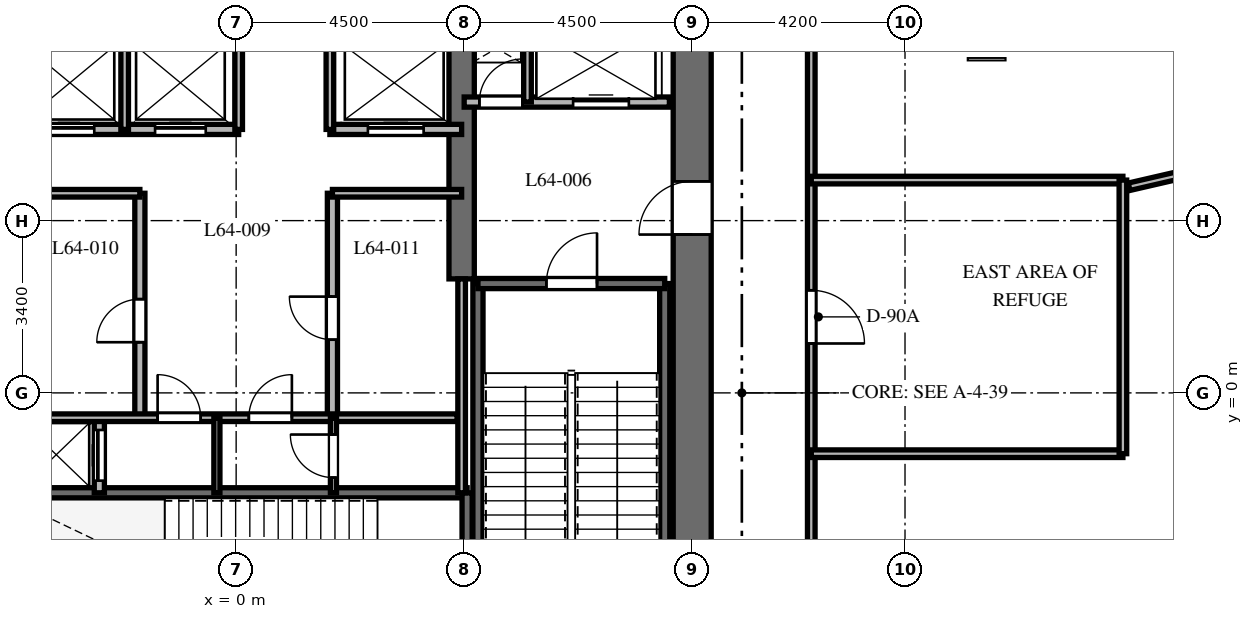
"""IFC4 building model, lengths in metres.
Left out: names, types, materials, properties, quantities, classifications, styles, units other than length and angle.
Written with IfcOpenShell. Run it as: python <this file> out.ifc"""

import sys

from ifc_helpers import new_model, si_unit, direction, frame, frame_2d, origin, place, context, subcontext, project, spatial, rectangle, extrude, element, fill, save


model = new_model("IFC4")
c1 = context("Model", 3, precision=1e-05, world=origin(), true_north=direction((0.0, 1.0)))
c2 = subcontext(c1, "Body", "Model", "MODEL_VIEW")
j1 = project(units=[si_unit("LENGTHUNIT", "METRE"), si_unit("PLANEANGLEUNIT", "RADIAN")], contexts=[c1])
p1 = place(None, origin())
s1 = spatial("IfcSite", under=j1, at=p1, CompositionType="ELEMENT")
p2 = place(p1, origin())
s2 = spatial("IfcBuilding", under=s1, at=p2, CompositionType="ELEMENT")
p3 = place(p2, frame((0.0, 0.0, 255.9)))
s3 = spatial("IfcBuildingStorey", under=s2, at=p3, CompositionType="ELEMENT", Elevation=255.9)
p4 = place(p3, frame((9.0, -7.125, 0.0), z_axis=(0.0, 0.0, 1.0), x_axis=(0.0, 1.0, 0.0)))
e1 = element("IfcWall", 1, at=p4, inside=s3, PredefinedType="SHEAR", context=c2, shape_type="SweptSolid", body=[
    extrude(rectangle(XDim=14.25, YDim=0.75, at=frame_2d((7.125, 0.0))), origin(), (0.0, 0.0, 1.0), 5.4),
])
p5 = place(p4, frame((10.25, 0.0, 0.0)))
e2 = element("IfcOpeningElement", 2, at=p5, cuts=e1, PredefinedType="OPENING", context=c2, shape_type="SweptSolid", body=[
    extrude(rectangle(XDim=1.05, YDim=2.15, at=frame_2d((0.525, 1.075))), frame((0.0, 0.385, 0.0), z_axis=(0.0, -1.0, 0.0), x_axis=(1.0, 0.0, 0.0)), (0.0, 0.0, 1.0), 0.77),
])
p6 = place(p3, frame((4.45, 2.25, 0.0), z_axis=(0.0, 0.0, 1.0), x_axis=(0.0, 1.0, 0.0)))
e3 = element("IfcWall", 3, at=p6, inside=s3, PredefinedType="SHEAR", context=c2, shape_type="SweptSolid", body=[
    extrude(rectangle(XDim=4.875, YDim=0.5, at=frame_2d((2.438, 0.0))), origin(), (0.0, 0.0, 1.0), 5.4),
])
for number, where, z_axis, x_axis in (
    (4, (4.772, -6.985, 0.0), (0.0, 0.0, 1.0), (0.0, 1.0, 0.0)),
    (5, (8.458, -6.985, 0.0), (0.0, 0.0, 1.0), (0.0, 1.0, 0.0)),
):
    element("IfcWall", number, at=place(p3, frame(where, z_axis=z_axis, x_axis=x_axis)), inside=s3, PredefinedType="SHEAR", context=c2, shape_type="SweptSolid", body=[
        extrude(rectangle(XDim=9.143, YDim=0.2, at=frame_2d((4.572, 0.0))), origin(), (0.0, 0.0, 1.0), 5.4),
    ])
p7 = place(p3, frame((4.772, 2.158, 0.0), z_axis=(0.0, 0.0, 1.0), x_axis=(1.0, 0.0, 0.0)))
e6 = element("IfcWall", 6, at=p7, inside=s3, PredefinedType="SHEAR", context=c2, shape_type="SweptSolid", body=[
    extrude(rectangle(XDim=3.686, YDim=0.2, at=frame_2d((1.843, 0.0))), origin(), (0.0, 0.0, 1.0), 5.4),
])
p8 = place(p7, frame((1.35, 0.0, 0.0)))
e7 = element("IfcOpeningElement", 7, at=p8, cuts=e6, PredefinedType="OPENING", context=c2, shape_type="SweptSolid", body=[
    extrude(rectangle(XDim=1.0, YDim=2.15, at=frame_2d((0.5, 1.075))), frame((0.0, 0.11, 0.0), z_axis=(0.0, -1.0, 0.0), x_axis=(1.0, 0.0, 0.0)), (0.0, 0.0, 1.0), 0.22),
])
p9 = place(p3, frame((-4.608, -1.972, 0.0), z_axis=(0.0, 0.0, 1.0), x_axis=(1.0, 0.0, 0.0)))
e8 = element("IfcWall", 8, at=p9, inside=s3, PredefinedType="SHEAR", context=c2, shape_type="SweptSolid", body=[
    extrude(rectangle(XDim=9.166, YDim=0.2, at=frame_2d((4.583, 0.0))), origin(), (0.0, 0.0, 1.0), 5.4),
])
p10 = place(p3, frame((4.558, -5.658, 0.0), z_axis=(0.0, 0.0, 1.0), x_axis=(0.0, 1.0, 0.0)))
e9 = element("IfcWall", 9, at=p10, inside=s3, PredefinedType="SHEAR", context=c2, shape_type="SweptSolid", body=[
    extrude(rectangle(XDim=3.686, YDim=0.2, at=frame_2d((1.843, 0.0))), origin(), (0.0, 0.0, 1.0), 5.4),
])
p11 = place(p3, frame((16.324, -19.275, 0.0), z_axis=(0.0, 0.0, 1.0), x_axis=(0.325083142304, 0.945685439557, 0.0)))
e10 = element("IfcWall", 10, at=p11, inside=s3, PredefinedType="SOLIDWALL", context=c2, shape_type="SweptSolid", body=[
    extrude(rectangle(XDim=20.224, YDim=0.45, at=frame_2d((10.112, 0.0))), origin(), (0.0, 0.0, 1.0), 5.1),
])
p12 = place(p3, frame((22.74, 2.452, 0.0), z_axis=(0.0, 0.0, 1.0), x_axis=(-0.437753424814, 0.899095066755, 0.0)))
e11 = element("IfcWall", 11, at=p12, inside=s3, PredefinedType="SOLIDWALL", context=c2, shape_type="SweptSolid", body=[
    extrude(rectangle(XDim=19.137, YDim=0.45, at=frame_2d((9.569, 0.0))), origin(), (0.0, 0.0, 1.0), 5.1),
])
p13 = place(p3, frame((4.5, 5.74, 0.0), z_axis=(0.0, 0.0, 1.0), x_axis=(1.0, 0.0, 0.0)))
e12 = element("IfcWall", 12, at=p13, inside=s3, PredefinedType="PARTITIONING", context=c2, shape_type="SweptSolid", body=[
    extrude(rectangle(XDim=4.05, YDim=0.2, at=frame_2d((2.025, 0.0))), origin(), (0.0, 0.0, 1.0), 5.1),
])
p14 = place(p13, frame((0.3, 0.0, 0.0)))
e13 = element("IfcOpeningElement", 13, at=p14, cuts=e12, PredefinedType="OPENING", context=c2, shape_type="SweptSolid", body=[
    extrude(rectangle(XDim=0.85, YDim=2.03, at=frame_2d((0.425, 1.015))), frame((0.0, 0.11, 0.0), z_axis=(0.0, -1.0, 0.0), x_axis=(1.0, 0.0, 0.0)), (0.0, 0.0, 1.0), 0.22),
])
p15 = place(p13, frame((2.15, 0.0, 0.0)))
e14 = element("IfcOpeningElement", 14, at=p15, cuts=e12, PredefinedType="OPENING", context=c2, shape_type="SweptSolid", body=[
    extrude(rectangle(XDim=1.1, YDim=2.2, at=frame_2d((0.55, 1.1))), frame((0.0, 0.11, 0.0), z_axis=(0.0, -1.0, 0.0), x_axis=(1.0, 0.0, 0.0)), (0.0, 0.0, 1.0), 0.22),
])
p16 = place(p3, frame((5.75, 5.74, 0.0), z_axis=(0.0, 0.0, 1.0), x_axis=(0.0, 1.0, 0.0)))
e15 = element("IfcWall", 15, at=p16, inside=s3, PredefinedType="PARTITIONING", context=c2, shape_type="SweptSolid", body=[
    extrude(rectangle(XDim=1.41, YDim=0.15, at=frame_2d((0.705, 0.0))), origin(), (0.0, 0.0, 1.0), 5.1),
])
p17 = place(p3, frame((-2.7, -1.972, 0.0), z_axis=(0.0, 0.0, 1.0), x_axis=(0.0, 1.0, 0.0)))
e16 = element("IfcWall", 16, at=p17, inside=s3, PredefinedType="PARTITIONING", context=c2, shape_type="SweptSolid", body=[
    extrude(rectangle(XDim=1.472, YDim=0.2, at=frame_2d((0.736, 0.0))), origin(), (0.0, 0.0, 1.0), 5.1),
])
p18 = place(p17, frame((0.24, 0.0, 0.0)))
e17 = element("IfcOpeningElement", 17, at=p18, cuts=e16, PredefinedType="OPENING", context=c2, shape_type="SweptSolid", body=[
    extrude(rectangle(XDim=1.0, YDim=2.2, at=frame_2d((0.5, 1.1))), frame((0.0, 0.11, 0.0), z_axis=(0.0, -1.0, 0.0), x_axis=(1.0, 0.0, 0.0)), (0.0, 0.0, 1.0), 0.22),
])
p19 = place(p3, frame((-4.45, 5.2, 0.0), z_axis=(0.0, 0.0, 1.0), x_axis=(1.0, 0.0, 0.0)))
e18 = element("IfcWall", 18, at=p19, inside=s3, PredefinedType="PARTITIONING", context=c2, shape_type="SweptSolid", body=[
    extrude(rectangle(XDim=4.5, YDim=0.2, at=frame_2d((2.25, 0.0))), origin(), (0.0, 0.0, 1.0), 5.1),
])
p20 = place(p19, frame((0.65, 0.0, 0.0)))
e19 = element("IfcOpeningElement", 19, at=p20, cuts=e18, PredefinedType="OPENING", context=c2, shape_type="SweptSolid", body=[
    extrude(rectangle(XDim=1.0, YDim=2.2, at=frame_2d((0.5, 1.1))), frame((0.0, 0.11, 0.0), z_axis=(0.0, -1.0, 0.0), x_axis=(1.0, 0.0, 0.0)), (0.0, 0.0, 1.0), 0.22),
])
p21 = place(p19, frame((2.85, 0.0, 0.0)))
e20 = element("IfcOpeningElement", 20, at=p21, cuts=e18, PredefinedType="OPENING", context=c2, shape_type="SweptSolid", body=[
    extrude(rectangle(XDim=1.0, YDim=2.2, at=frame_2d((0.5, 1.1))), frame((0.0, 0.11, 0.0), z_axis=(0.0, -1.0, 0.0), x_axis=(1.0, 0.0, 0.0)), (0.0, 0.0, 1.0), 0.22),
])
p22 = place(p3, frame((1.85, 5.2, 0.0), z_axis=(0.0, 0.0, 1.0), x_axis=(1.0, 0.0, 0.0)))
e21 = element("IfcWall", 21, at=p22, inside=s3, PredefinedType="PARTITIONING", context=c2, shape_type="SweptSolid", body=[
    extrude(rectangle(XDim=2.6, YDim=0.2, at=frame_2d((1.3, 0.0))), origin(), (0.0, 0.0, 1.0), 5.1),
])
p23 = place(p22, frame((0.75, 0.0, 0.0)))
e22 = element("IfcOpeningElement", 22, at=p23, cuts=e21, PredefinedType="OPENING", context=c2, shape_type="SweptSolid", body=[
    extrude(rectangle(XDim=1.1, YDim=2.2, at=frame_2d((0.55, 1.1))), frame((0.0, 0.11, 0.0), z_axis=(0.0, -1.0, 0.0), x_axis=(1.0, 0.0, 0.0)), (0.0, 0.0, 1.0), 0.22),
])
p24 = place(p3, frame((-2.2, 5.2, 0.0), z_axis=(0.0, 0.0, 1.0), x_axis=(0.0, 1.0, 0.0)))
e23 = element("IfcWall", 23, at=p24, inside=s3, PredefinedType="PARTITIONING", context=c2, shape_type="SweptSolid", body=[
    extrude(rectangle(XDim=1.85, YDim=0.15, at=frame_2d((0.925, 0.0))), origin(), (0.0, 0.0, 1.0), 5.1),
])
for number, where, z_axis, x_axis in (
    (24, (0.05, 5.2, 0.0), (0.0, 0.0, 1.0), (0.0, 1.0, 0.0)),
    (25, (1.85, 5.2, 0.0), (0.0, 0.0, 1.0), (0.0, 1.0, 0.0)),
):
    element("IfcWall", number, at=place(p3, frame(where, z_axis=z_axis, x_axis=x_axis)), inside=s3, PredefinedType="PARTITIONING", context=c2, shape_type="SweptSolid", body=[
        extrude(rectangle(XDim=1.95, YDim=0.15, at=frame_2d((0.975, 0.0))), origin(), (0.0, 0.0, 1.0), 5.1),
    ])
p25 = place(p3, frame((4.45, -1.972, 0.0), z_axis=(0.0, 0.0, 1.0), x_axis=(0.0, 1.0, 0.0)))
e26 = element("IfcWall", 26, at=p25, inside=s3, PredefinedType="PARTITIONING", context=c2, shape_type="SweptSolid", body=[
    extrude(rectangle(XDim=4.222, YDim=0.15, at=frame_2d((2.111, 0.0))), origin(), (0.0, 0.0, 1.0), 5.1),
])
p26 = place(p3, frame((-1.9, -0.5, 0.0), z_axis=(0.0, 0.0, 1.0), x_axis=(0.0, 1.0, 0.0)))
e27 = element("IfcWall", 27, at=p26, inside=s3, PredefinedType="PARTITIONING", context=c2, shape_type="SweptSolid", body=[
    extrude(rectangle(XDim=4.44, YDim=0.2, at=frame_2d((2.22, 0.0))), origin(), (0.0, 0.0, 1.0), 5.1),
])
p27 = place(p26, frame((1.5, 0.0, 0.0)))
e28 = element("IfcOpeningElement", 28, at=p27, cuts=e27, PredefinedType="OPENING", context=c2, shape_type="SweptSolid", body=[
    extrude(rectangle(XDim=0.85, YDim=2.03, at=frame_2d((0.425, 1.015))), frame((0.0, 0.11, 0.0), z_axis=(0.0, -1.0, 0.0), x_axis=(1.0, 0.0, 0.0)), (0.0, 0.0, 1.0), 0.22),
])
p28 = place(p3, frame((-4.45, 3.94, 0.0), z_axis=(0.0, 0.0, 1.0), x_axis=(1.0, 0.0, 0.0)))
e29 = element("IfcWall", 29, at=p28, inside=s3, PredefinedType="PARTITIONING", context=c2, shape_type="SweptSolid", body=[
    extrude(rectangle(XDim=2.55, YDim=0.15, at=frame_2d((1.275, 0.0))), origin(), (0.0, 0.0, 1.0), 5.1),
])
p29 = place(p3, frame((1.9, -0.5, 0.0), z_axis=(0.0, 0.0, 1.0), x_axis=(0.0, 1.0, 0.0)))
e30 = element("IfcWall", 30, at=p29, inside=s3, PredefinedType="PARTITIONING", context=c2, shape_type="SweptSolid", body=[
    extrude(rectangle(XDim=4.44, YDim=0.2, at=frame_2d((2.22, 0.0))), origin(), (0.0, 0.0, 1.0), 5.1),
])
p30 = place(p29, frame((1.55, 0.0, 0.0)))
e31 = element("IfcOpeningElement", 31, at=p30, cuts=e30, PredefinedType="OPENING", context=c2, shape_type="SweptSolid", body=[
    extrude(rectangle(XDim=0.85, YDim=2.03, at=frame_2d((0.425, 1.015))), frame((0.0, 0.11, 0.0), z_axis=(0.0, -1.0, 0.0), x_axis=(1.0, 0.0, 0.0)), (0.0, 0.0, 1.0), 0.22),
])
p31 = place(p3, frame((1.9, 3.94, 0.0), z_axis=(0.0, 0.0, 1.0), x_axis=(1.0, 0.0, 0.0)))
e32 = element("IfcWall", 32, at=p31, inside=s3, PredefinedType="PARTITIONING", context=c2, shape_type="SweptSolid", body=[
    extrude(rectangle(XDim=2.55, YDim=0.15, at=frame_2d((1.275, 0.0))), origin(), (0.0, 0.0, 1.0), 5.1),
])
p32 = place(p3, frame((-4.36, -0.49, 0.0), z_axis=(0.0, 0.0, 1.0), x_axis=(1.0, 0.0, 0.0)))
e33 = element("IfcWall", 33, at=p32, inside=s3, PredefinedType="PARTITIONING", context=c2, shape_type="SweptSolid", body=[
    extrude(rectangle(XDim=8.72, YDim=0.15, at=frame_2d((4.36, 0.0))), origin(), (0.0, 0.0, 1.0), 5.1),
])
p33 = place(p32, frame((2.81, 0.0, 0.0)))
e34 = element("IfcOpeningElement", 34, at=p33, cuts=e33, PredefinedType="OPENING", context=c2, shape_type="SweptSolid", body=[
    extrude(rectangle(XDim=0.85, YDim=2.03, at=frame_2d((0.425, 1.015))), frame((0.0, 0.085, 0.0), z_axis=(0.0, -1.0, 0.0), x_axis=(1.0, 0.0, 0.0)), (0.0, 0.0, 1.0), 0.17),
])
p34 = place(p32, frame((4.61, 0.0, 0.0)))
e35 = element("IfcOpeningElement", 35, at=p34, cuts=e33, PredefinedType="OPENING", context=c2, shape_type="SweptSolid", body=[
    extrude(rectangle(XDim=0.85, YDim=2.03, at=frame_2d((0.425, 1.015))), frame((0.0, 0.085, 0.0), z_axis=(0.0, -1.0, 0.0), x_axis=(1.0, 0.0, 0.0)), (0.0, 0.0, 1.0), 0.17),
])
p35 = place(p3, frame((-0.38, -1.972, 0.0), z_axis=(0.0, 0.0, 1.0), x_axis=(0.0, 1.0, 0.0)))
e36 = element("IfcWall", 36, at=p35, inside=s3, PredefinedType="PARTITIONING", context=c2, shape_type="SweptSolid", body=[
    extrude(rectangle(XDim=1.472, YDim=0.12, at=frame_2d((0.736, 0.0))), origin(), (0.0, 0.0, 1.0), 5.1),
])
p36 = place(p3, frame((1.92, -1.972, 0.0), z_axis=(0.0, 0.0, 1.0), x_axis=(0.0, 1.0, 0.0)))
e37 = element("IfcWall", 37, at=p36, inside=s3, PredefinedType="PARTITIONING", context=c2, shape_type="SweptSolid", body=[
    extrude(rectangle(XDim=1.472, YDim=0.12, at=frame_2d((0.736, 0.0))), origin(), (0.0, 0.0, 1.0), 5.1),
])
p37 = place(p36, frame((0.3, 0.0, 0.0)))
e38 = element("IfcOpeningElement", 38, at=p37, cuts=e37, PredefinedType="OPENING", context=c2, shape_type="SweptSolid", body=[
    extrude(rectangle(XDim=0.85, YDim=2.03, at=frame_2d((0.425, 1.015))), frame((0.0, 0.07, 0.0), z_axis=(0.0, -1.0, 0.0), x_axis=(1.0, 0.0, 0.0)), (0.0, 0.0, 1.0), 0.14),
])
p38 = place(p3, frame((11.35, 9.85, 0.0), z_axis=(0.0, 0.0, 1.0), x_axis=(0.0, -1.0, 0.0)))
e39 = element("IfcWall", 39, at=p38, inside=s3, PredefinedType="PARTITIONING", context=c2, shape_type="SweptSolid", body=[
    extrude(rectangle(XDim=19.7, YDim=0.15, at=frame_2d((9.85, 0.0))), origin(), (0.0, 0.0, 1.0), 3.29),
])
p39 = place(p38, frame((7.825, 0.0, 0.0)))
e40 = element("IfcOpeningElement", 40, at=p39, cuts=e39, PredefinedType="OPENING", context=c2, shape_type="SweptSolid", body=[
    extrude(rectangle(XDim=1.05, YDim=2.15, at=frame_2d((0.525, 1.075))), frame((0.0, 0.085, 0.0), z_axis=(0.0, -1.0, 0.0), x_axis=(1.0, 0.0, 0.0)), (0.0, 0.0, 1.0), 0.17),
])
p40 = place(p38, frame((14.755, 0.0, 0.0)))
e41 = element("IfcOpeningElement", 41, at=p40, cuts=e39, PredefinedType="OPENING", context=c2, shape_type="SweptSolid", body=[
    extrude(rectangle(XDim=1.0, YDim=2.15, at=frame_2d((0.5, 1.075))), frame((0.0, 0.085, 0.0), z_axis=(0.0, -1.0, 0.0), x_axis=(1.0, 0.0, 0.0)), (0.0, 0.0, 1.0), 0.17),
])
for number, where, z_axis, x_axis in (
    (42, (11.35, -1.2, 0.0), (0.0, 0.0, 1.0), (1.0, 0.0, 0.0)),
    (43, (11.35, 4.2, 0.0), (0.0, 0.0, 1.0), (1.0, 0.0, 0.0)),
):
    element("IfcWall", number, at=place(p3, frame(where, z_axis=z_axis, x_axis=x_axis)), inside=s3, PredefinedType="PARTITIONING", context=c2, shape_type="SweptSolid", body=[
        extrude(rectangle(XDim=6.15, YDim=0.15, at=frame_2d((3.075, 0.0))), origin(), (0.0, 0.0, 1.0), 4.541),
    ])
p41 = place(p3, frame((17.5, -1.2, 0.0), z_axis=(0.0, 0.0, 1.0), x_axis=(0.0, 1.0, 0.0)))
e44 = element("IfcWall", 44, at=p41, inside=s3, PredefinedType="PARTITIONING", context=c2, shape_type="SweptSolid", body=[
    extrude(rectangle(XDim=5.4, YDim=0.15, at=frame_2d((2.7, 0.0))), origin(), (0.0, 0.0, 1.0), 5.1),
])
p42 = place(p3, frame((17.623, 4.069, 0.0), z_axis=(0.0, 0.0, 1.0), x_axis=(0.974369561662, 0.224953233598, 0.0)))
e45 = element("IfcWall", 45, at=p42, inside=s3, PredefinedType="PARTITIONING", context=c2, shape_type="SweptSolid", body=[
    extrude(rectangle(XDim=3.995, YDim=0.15, at=frame_2d((1.998, 0.0))), origin(), (0.0, 0.0, 1.0), 3.29),
])
p43 = place(p8, origin())
e46 = element("IfcDoor", 46, at=p43, inside=s3, OperationType="SINGLE_SWING_RIGHT", PredefinedType="DOOR", context=c2, shape_type="SweptSolid", body=[
    extrude(rectangle(XDim=1.0, YDim=2.15, at=frame_2d((0.5, 1.075))), frame((0.0, 0.025, 0.0), z_axis=(0.0, -1.0, 0.0), x_axis=(1.0, 0.0, 0.0)), (0.0, 0.0, 1.0), 0.05),
])
fill(e7, e46)
p44 = place(p5, origin())
e47 = element("IfcDoor", 47, at=p44, inside=s3, OperationType="SINGLE_SWING_LEFT", PredefinedType="DOOR", context=c2, shape_type="SweptSolid", body=[
    extrude(rectangle(XDim=1.05, YDim=2.15, at=frame_2d((0.525, 1.075))), frame((0.0, 0.025, 0.0), z_axis=(0.0, -1.0, 0.0), x_axis=(1.0, 0.0, 0.0)), (0.0, 0.0, 1.0), 0.05),
])
fill(e2, e47)
p45 = place(p14, origin())
e48 = element("IfcDoor", 48, at=p45, inside=s3, OperationType="SINGLE_SWING_RIGHT", PredefinedType="DOOR", context=c2, shape_type="SweptSolid", body=[
    extrude(rectangle(XDim=0.85, YDim=2.03, at=frame_2d((0.425, 1.015))), frame((0.0, 0.025, 0.0), z_axis=(0.0, -1.0, 0.0), x_axis=(1.0, 0.0, 0.0)), (0.0, 0.0, 1.0), 0.05),
])
fill(e13, e48)
p46 = place(p15, origin())
e49 = element("IfcDoor", 49, at=p46, inside=s3, OperationType="SLIDING_TO_RIGHT", PredefinedType="DOOR", context=c2, shape_type="SweptSolid", body=[
    extrude(rectangle(XDim=1.1, YDim=2.2, at=frame_2d((0.55, 1.1))), frame((0.0, 0.025, 0.0), z_axis=(0.0, -1.0, 0.0), x_axis=(1.0, 0.0, 0.0)), (0.0, 0.0, 1.0), 0.05),
])
fill(e14, e49)
p47 = place(p18, origin())
e50 = element("IfcDoor", 50, at=p47, inside=s3, OperationType="SLIDING_TO_LEFT", PredefinedType="DOOR", context=c2, shape_type="SweptSolid", body=[
    extrude(rectangle(XDim=1.0, YDim=2.2, at=frame_2d((0.5, 1.1))), frame((0.0, 0.025, 0.0), z_axis=(0.0, -1.0, 0.0), x_axis=(1.0, 0.0, 0.0)), (0.0, 0.0, 1.0), 0.05),
])
fill(e17, e50)
p48 = place(p20, origin())
e51 = element("IfcDoor", 51, at=p48, inside=s3, OperationType="SLIDING_TO_LEFT", PredefinedType="DOOR", context=c2, shape_type="SweptSolid", body=[
    extrude(rectangle(XDim=1.0, YDim=2.2, at=frame_2d((0.5, 1.1))), frame((0.0, 0.025, 0.0), z_axis=(0.0, -1.0, 0.0), x_axis=(1.0, 0.0, 0.0)), (0.0, 0.0, 1.0), 0.05),
])
fill(e19, e51)
p49 = place(p21, origin())
e52 = element("IfcDoor", 52, at=p49, inside=s3, OperationType="SLIDING_TO_RIGHT", PredefinedType="DOOR", context=c2, shape_type="SweptSolid", body=[
    extrude(rectangle(XDim=1.0, YDim=2.2, at=frame_2d((0.5, 1.1))), frame((0.0, 0.025, 0.0), z_axis=(0.0, -1.0, 0.0), x_axis=(1.0, 0.0, 0.0)), (0.0, 0.0, 1.0), 0.05),
])
fill(e20, e52)
p50 = place(p23, origin())
e53 = element("IfcDoor", 53, at=p50, inside=s3, OperationType="SLIDING_TO_RIGHT", PredefinedType="DOOR", context=c2, shape_type="SweptSolid", body=[
    extrude(rectangle(XDim=1.1, YDim=2.2, at=frame_2d((0.55, 1.1))), frame((0.0, 0.025, 0.0), z_axis=(0.0, -1.0, 0.0), x_axis=(1.0, 0.0, 0.0)), (0.0, 0.0, 1.0), 0.05),
])
fill(e22, e53)
p51 = place(p27, origin())
e54 = element("IfcDoor", 54, at=p51, inside=s3, OperationType="SINGLE_SWING_LEFT", PredefinedType="DOOR", context=c2, shape_type="SweptSolid", body=[
    extrude(rectangle(XDim=0.85, YDim=2.03, at=frame_2d((0.425, 1.015))), frame((0.0, 0.025, 0.0), z_axis=(0.0, -1.0, 0.0), x_axis=(1.0, 0.0, 0.0)), (0.0, 0.0, 1.0), 0.05),
])
fill(e28, e54)
p52 = place(p30, origin())
e55 = element("IfcDoor", 55, at=p52, inside=s3, OperationType="SINGLE_SWING_RIGHT", PredefinedType="DOOR", context=c2, shape_type="SweptSolid", body=[
    extrude(rectangle(XDim=0.85, YDim=2.03, at=frame_2d((0.425, 1.015))), frame((0.0, 0.025, 0.0), z_axis=(0.0, -1.0, 0.0), x_axis=(1.0, 0.0, 0.0)), (0.0, 0.0, 1.0), 0.05),
])
fill(e31, e55)
p53 = place(p33, origin())
e56 = element("IfcDoor", 56, at=p53, inside=s3, OperationType="SINGLE_SWING_LEFT", PredefinedType="DOOR", context=c2, shape_type="SweptSolid", body=[
    extrude(rectangle(XDim=0.85, YDim=2.03, at=frame_2d((0.425, 1.015))), frame((0.0, 0.025, 0.0), z_axis=(0.0, -1.0, 0.0), x_axis=(1.0, 0.0, 0.0)), (0.0, 0.0, 1.0), 0.05),
])
fill(e34, e56)
p54 = place(p34, origin())
e57 = element("IfcDoor", 57, at=p54, inside=s3, OperationType="SINGLE_SWING_RIGHT", PredefinedType="DOOR", context=c2, shape_type="SweptSolid", body=[
    extrude(rectangle(XDim=0.85, YDim=2.03, at=frame_2d((0.425, 1.015))), frame((0.0, 0.025, 0.0), z_axis=(0.0, -1.0, 0.0), x_axis=(1.0, 0.0, 0.0)), (0.0, 0.0, 1.0), 0.05),
])
fill(e35, e57)
p55 = place(p37, origin())
e58 = element("IfcDoor", 58, at=p55, inside=s3, OperationType="SINGLE_SWING_RIGHT", PredefinedType="DOOR", context=c2, shape_type="SweptSolid", body=[
    extrude(rectangle(XDim=0.85, YDim=2.03, at=frame_2d((0.425, 1.015))), frame((0.0, 0.025, 0.0), z_axis=(0.0, -1.0, 0.0), x_axis=(1.0, 0.0, 0.0)), (0.0, 0.0, 1.0), 0.05),
])
fill(e38, e58)
p56 = place(p39, origin())
e59 = element("IfcDoor", 59, at=p56, inside=s3, OperationType="SINGLE_SWING_RIGHT", PredefinedType="DOOR", context=c2, shape_type="SweptSolid", body=[
    extrude(rectangle(XDim=1.05, YDim=2.15, at=frame_2d((0.525, 1.075))), frame((0.0, 0.025, 0.0), z_axis=(0.0, -1.0, 0.0), x_axis=(1.0, 0.0, 0.0)), (0.0, 0.0, 1.0), 0.05),
])
fill(e40, e59)
save(model, sys.argv[1])
